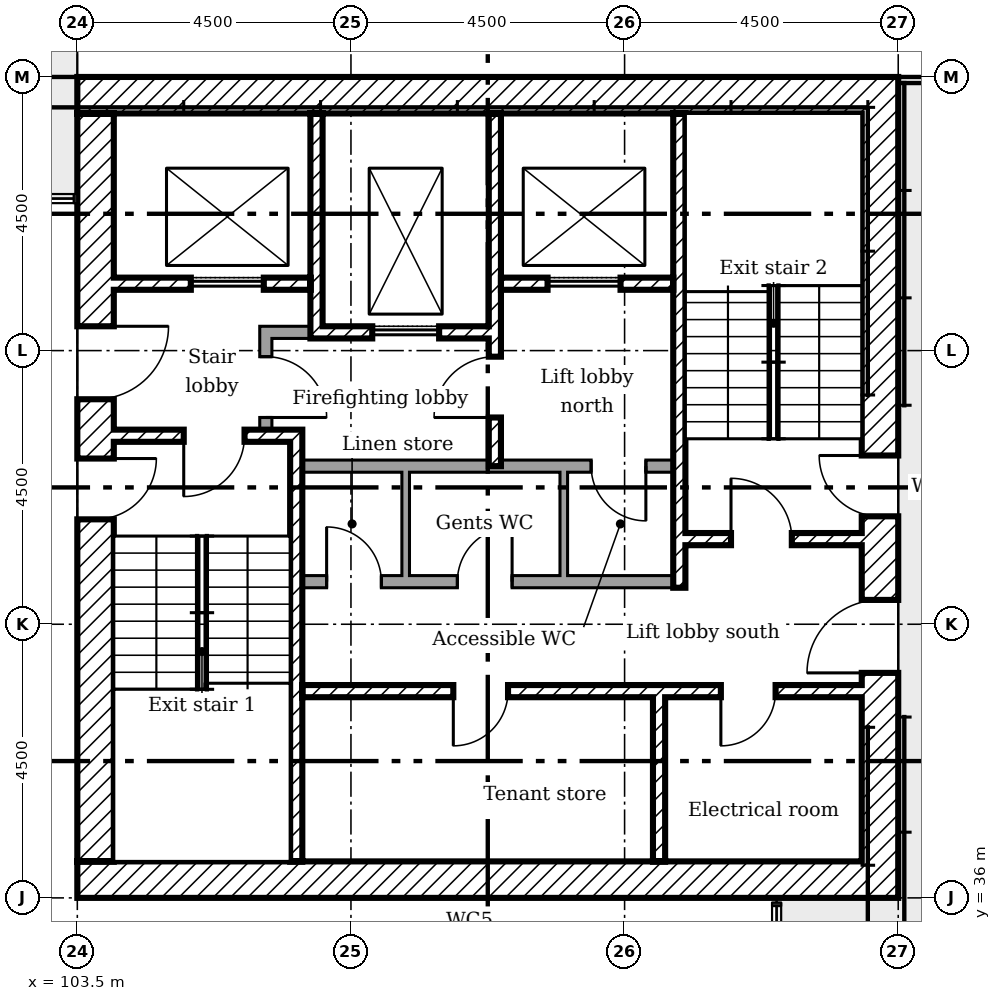
"""IFC4 building model, lengths in metres.
Left out: names, types, materials, properties, quantities, classifications, styles, units other than length and angle.
Written with IfcOpenShell. Run it as: python <this file> out.ifc"""

import sys

from ifc_helpers import new_model, si_unit, direction, frame, frame_2d, origin, place, context, subcontext, project, spatial, rectangle, extrude, element, fill, save


model = new_model("IFC4")
c1 = context("Model", 3, precision=1e-05, world=origin(), true_north=direction((0.0, 1.0)))
c2 = subcontext(c1, "Body", "Model", "MODEL_VIEW")
j1 = project(units=[si_unit("LENGTHUNIT", "METRE"), si_unit("PLANEANGLEUNIT", "RADIAN")], contexts=[c1])
p1 = place(None, origin())
s1 = spatial("IfcSite", under=j1, at=p1, CompositionType="ELEMENT")
p2 = place(p1, origin())
s2 = spatial("IfcBuilding", under=s1, at=p2, CompositionType="ELEMENT")
p3 = place(p2, frame((0.0, 0.0, 143.8)))
s3 = spatial("IfcBuildingStorey", under=s2, at=p3, CompositionType="ELEMENT", Elevation=143.8)
p4 = place(p3, frame((116.7, 36.0, 0.0), z_axis=(0.0, 0.0, 1.0), x_axis=(0.0, 1.0, 0.0)))
e1 = element("IfcWall", 1, at=p4, inside=s3, PredefinedType="SHEAR", context=c2, shape_type="SweptSolid", body=[
    extrude(rectangle(XDim=13.5, YDim=0.6, at=frame_2d((6.75, 0.0))), origin(), (0.0, 0.0, 1.0), 3.35),
])
p5 = place(p4, frame((3.7, 0.0, 0.0)))
e2 = element("IfcOpeningElement", 2, at=p5, cuts=e1, PredefinedType="OPENING", context=c2, shape_type="SweptSolid", body=[
    extrude(rectangle(XDim=1.2, YDim=2.1, at=frame_2d((0.6, 1.05))), frame((0.0, 0.31, 0.0), z_axis=(0.0, -1.0, 0.0), x_axis=(1.0, 0.0, 0.0)), (0.0, 0.0, 1.0), 0.62),
])
p6 = place(p4, frame((6.275, 0.0, 0.0)))
e3 = element("IfcOpeningElement", 3, at=p6, cuts=e1, PredefinedType="OPENING", context=c2, shape_type="SweptSolid", body=[
    extrude(rectangle(XDim=1.0, YDim=2.1, at=frame_2d((0.5, 1.05))), frame((0.0, 0.31, 0.0), z_axis=(0.0, -1.0, 0.0), x_axis=(1.0, 0.0, 0.0)), (0.0, 0.0, 1.0), 0.62),
])
for number, where in (
    (4, (103.5, 49.2, 0.0)),
    (5, (103.5, 36.3, 0.0)),
):
    element("IfcWall", number, at=place(p3, frame(where)), inside=s3, PredefinedType="SHEAR", context=c2, shape_type="SweptSolid", body=[
        extrude(rectangle(XDim=12.9, YDim=0.6, at=frame_2d((6.45, 0.0))), origin(), (0.0, 0.0, 1.0), 3.35),
    ])
p7 = place(p3, frame((103.8, 36.6, 0.0), z_axis=(0.0, 0.0, 1.0), x_axis=(0.0, 1.0, 0.0)))
e6 = element("IfcWall", 6, at=p7, inside=s3, PredefinedType="SHEAR", context=c2, shape_type="SweptSolid", body=[
    extrude(rectangle(XDim=12.3, YDim=0.6, at=frame_2d((6.15, 0.0))), origin(), (0.0, 0.0, 1.0), 3.35),
])
p8 = place(p7, frame((7.6, 0.0, 0.0)))
e7 = element("IfcOpeningElement", 7, at=p8, cuts=e6, PredefinedType="OPENING", context=c2, shape_type="SweptSolid", body=[
    extrude(rectangle(XDim=1.2, YDim=2.1, at=frame_2d((0.6, 1.05))), frame((0.0, 0.31, 0.0), z_axis=(0.0, -1.0, 0.0), x_axis=(1.0, 0.0, 0.0)), (0.0, 0.0, 1.0), 0.62),
])
p9 = place(p7, frame((5.625, 0.0, 0.0)))
e8 = element("IfcOpeningElement", 8, at=p9, cuts=e6, PredefinedType="OPENING", context=c2, shape_type="SweptSolid", body=[
    extrude(rectangle(XDim=1.0, YDim=2.1, at=frame_2d((0.5, 1.05))), frame((0.0, 0.31, 0.0), z_axis=(0.0, -1.0, 0.0), x_axis=(1.0, 0.0, 0.0)), (0.0, 0.0, 1.0), 0.62),
])
p10 = place(p3, frame((107.433, 48.9, 0.0), z_axis=(0.0, 0.0, 1.0), x_axis=(0.0, -1.0, 0.0)))
e9 = element("IfcWall", 9, at=p10, inside=s3, PredefinedType="SHEAR", context=c2, shape_type="SweptSolid", body=[
    extrude(rectangle(XDim=3.7, YDim=0.2, at=frame_2d((1.85, 0.0))), origin(), (0.0, 0.0, 1.0), 3.35),
])
p11 = place(p3, frame((110.367, 48.9, 0.0), z_axis=(0.0, 0.0, 1.0), x_axis=(0.0, -1.0, 0.0)))
e10 = element("IfcWall", 10, at=p11, inside=s3, PredefinedType="SHEAR", context=c2, shape_type="SweptSolid", body=[
    extrude(rectangle(XDim=5.8, YDim=0.2, at=frame_2d((2.9, 0.0))), origin(), (0.0, 0.0, 1.0), 3.35),
])
p12 = place(p11, frame((4.0, 0.0, 0.0)))
e11 = element("IfcOpeningElement", 11, at=p12, cuts=e10, PredefinedType="OPENING", context=c2, shape_type="SweptSolid", body=[
    extrude(rectangle(XDim=1.0, YDim=2.1, at=frame_2d((0.5, 1.05))), frame((0.0, 0.11, 0.0), z_axis=(0.0, -1.0, 0.0), x_axis=(1.0, 0.0, 0.0)), (0.0, 0.0, 1.0), 0.22),
])
p13 = place(p3, frame((113.067, 36.6, 0.0), z_axis=(0.0, 0.0, 1.0), x_axis=(0.0, 1.0, 0.0)))
e12 = element("IfcWall", 12, at=p13, inside=s3, PredefinedType="SHEAR", context=c2, shape_type="SweptSolid", body=[
    extrude(rectangle(XDim=2.7, YDim=0.2, at=frame_2d((1.35, 0.0))), origin(), (0.0, 0.0, 1.0), 3.35),
])
p14 = place(p3, frame((106.5, 45.3, 0.0)))
e13 = element("IfcWall", 13, at=p14, inside=s3, PredefinedType="PARTITIONING", context=c2, shape_type="SweptSolid", body=[
    extrude(rectangle(XDim=0.833, YDim=0.2, at=frame_2d((0.417, 0.0))), origin(), (0.0, 0.0, 1.0), 3.35),
])
p15 = place(p3, frame((106.6, 43.7, 0.0), z_axis=(0.0, 0.0, 1.0), x_axis=(0.0, 1.0, 0.0)))
e14 = element("IfcWall", 14, at=p15, inside=s3, PredefinedType="PARTITIONING", context=c2, shape_type="SweptSolid", body=[
    extrude(rectangle(XDim=1.5, YDim=0.2, at=frame_2d((0.75, 0.0))), origin(), (0.0, 0.0, 1.0), 3.35),
])
p16 = place(p15, frame((0.2, 0.0, 0.0)))
e15 = element("IfcOpeningElement", 15, at=p16, cuts=e14, PredefinedType="OPENING", context=c2, shape_type="SweptSolid", body=[
    extrude(rectangle(XDim=1.0, YDim=2.1, at=frame_2d((0.5, 1.05))), frame((0.0, 0.11, 0.0), z_axis=(0.0, -1.0, 0.0), x_axis=(1.0, 0.0, 0.0)), (0.0, 0.0, 1.0), 0.22),
])
p17 = place(p3, frame((104.1, 46.1, 0.0)))
e16 = element("IfcWall", 16, at=p17, inside=s3, PredefinedType="SHEAR", context=c2, shape_type="SweptSolid", body=[
    extrude(rectangle(XDim=3.233, YDim=0.2, at=frame_2d((1.617, 0.0))), origin(), (0.0, 0.0, 1.0), 3.35),
])
p18 = place(p17, frame((1.267, 0.0, 0.0)))
e17 = element("IfcOpeningElement", 17, at=p18, cuts=e16, PredefinedType="OPENING", context=c2, shape_type="SweptSolid", body=[
    extrude(rectangle(XDim=1.2, YDim=2.1, at=frame_2d((0.6, 1.05))), frame((0.0, 0.11, 0.0), z_axis=(0.0, -1.0, 0.0), x_axis=(1.0, 0.0, 0.0)), (0.0, 0.0, 1.0), 0.22),
])
p19 = place(p3, frame((110.467, 46.1, 0.0)))
e18 = element("IfcWall", 18, at=p19, inside=s3, PredefinedType="SHEAR", context=c2, shape_type="SweptSolid", body=[
    extrude(rectangle(XDim=2.833, YDim=0.2, at=frame_2d((1.417, 0.0))), origin(), (0.0, 0.0, 1.0), 3.35),
])
p20 = place(p19, frame((0.767, 0.0, 0.0)))
e19 = element("IfcOpeningElement", 19, at=p20, cuts=e18, PredefinedType="OPENING", context=c2, shape_type="SweptSolid", body=[
    extrude(rectangle(XDim=1.2, YDim=2.1, at=frame_2d((0.6, 1.05))), frame((0.0, 0.11, 0.0), z_axis=(0.0, -1.0, 0.0), x_axis=(1.0, 0.0, 0.0)), (0.0, 0.0, 1.0), 0.22),
])
p21 = place(p3, frame((107.533, 45.3, 0.0)))
e20 = element("IfcWall", 20, at=p21, inside=s3, PredefinedType="SHEAR", context=c2, shape_type="SweptSolid", body=[
    extrude(rectangle(XDim=2.733, YDim=0.2, at=frame_2d((1.367, 0.0))), origin(), (0.0, 0.0, 1.0), 3.35),
])
p22 = place(p21, frame((0.817, 0.0, 0.0)))
e21 = element("IfcOpeningElement", 21, at=p22, cuts=e20, PredefinedType="OPENING", context=c2, shape_type="SweptSolid", body=[
    extrude(rectangle(XDim=1.1, YDim=2.1, at=frame_2d((0.55, 1.05))), frame((0.0, 0.11, 0.0), z_axis=(0.0, -1.0, 0.0), x_axis=(1.0, 0.0, 0.0)), (0.0, 0.0, 1.0), 0.22),
])
p23 = place(p3, frame((107.2, 39.4, 0.0)))
e22 = element("IfcWall", 22, at=p23, inside=s3, PredefinedType="SHEAR", context=c2, shape_type="SweptSolid", body=[
    extrude(rectangle(XDim=9.2, YDim=0.2, at=frame_2d((4.6, 0.0))), origin(), (0.0, 0.0, 1.0), 3.35),
])
p24 = place(p23, frame((2.483, 0.0, 0.0)))
e23 = element("IfcOpeningElement", 23, at=p24, cuts=e22, PredefinedType="OPENING", context=c2, shape_type="SweptSolid", body=[
    extrude(rectangle(XDim=0.9, YDim=2.1, at=frame_2d((0.45, 1.05))), frame((0.0, 0.11, 0.0), z_axis=(0.0, -1.0, 0.0), x_axis=(1.0, 0.0, 0.0)), (0.0, 0.0, 1.0), 0.22),
])
p25 = place(p23, frame((6.883, 0.0, 0.0)))
e24 = element("IfcOpeningElement", 24, at=p25, cuts=e22, PredefinedType="OPENING", context=c2, shape_type="SweptSolid", body=[
    extrude(rectangle(XDim=0.9, YDim=2.1, at=frame_2d((0.45, 1.05))), frame((0.0, 0.11, 0.0), z_axis=(0.0, -1.0, 0.0), x_axis=(1.0, 0.0, 0.0)), (0.0, 0.0, 1.0), 0.22),
])
p26 = place(p3, frame((107.1, 36.6, 0.0), z_axis=(0.0, 0.0, 1.0), x_axis=(0.0, 1.0, 0.0)))
e25 = element("IfcWall", 25, at=p26, inside=s3, PredefinedType="SHEAR", context=c2, shape_type="SweptSolid", body=[
    extrude(rectangle(XDim=7.1, YDim=0.2, at=frame_2d((3.55, 0.0))), origin(), (0.0, 0.0, 1.0), 3.35),
])
p27 = place(p3, frame((104.1, 43.6, 0.0)))
e26 = element("IfcWall", 26, at=p27, inside=s3, PredefinedType="SHEAR", context=c2, shape_type="SweptSolid", body=[
    extrude(rectangle(XDim=2.9, YDim=0.2, at=frame_2d((1.45, 0.0))), origin(), (0.0, 0.0, 1.0), 3.35),
])
p28 = place(p27, frame((1.15, 0.0, 0.0)))
e27 = element("IfcOpeningElement", 27, at=p28, cuts=e26, PredefinedType="OPENING", context=c2, shape_type="SweptSolid", body=[
    extrude(rectangle(XDim=1.0, YDim=2.1, at=frame_2d((0.5, 1.05))), frame((0.0, 0.11, 0.0), z_axis=(0.0, -1.0, 0.0), x_axis=(1.0, 0.0, 0.0)), (0.0, 0.0, 1.0), 0.22),
])
p29 = place(p3, frame((113.5, 41.9, 0.0)))
e28 = element("IfcWall", 28, at=p29, inside=s3, PredefinedType="SHEAR", context=c2, shape_type="SweptSolid", body=[
    extrude(rectangle(XDim=2.9, YDim=0.2, at=frame_2d((1.45, 0.0))), origin(), (0.0, 0.0, 1.0), 3.35),
])
p30 = place(p29, frame((0.75, 0.0, 0.0)))
e29 = element("IfcOpeningElement", 29, at=p30, cuts=e28, PredefinedType="OPENING", context=c2, shape_type="SweptSolid", body=[
    extrude(rectangle(XDim=1.0, YDim=2.1, at=frame_2d((0.5, 1.05))), frame((0.0, 0.11, 0.0), z_axis=(0.0, -1.0, 0.0), x_axis=(1.0, 0.0, 0.0)), (0.0, 0.0, 1.0), 0.22),
])
p31 = place(p3, frame((113.4, 41.1, 0.0), z_axis=(0.0, 0.0, 1.0), x_axis=(0.0, 1.0, 0.0)))
e30 = element("IfcWall", 30, at=p31, inside=s3, PredefinedType="SHEAR", context=c2, shape_type="SweptSolid", body=[
    extrude(rectangle(XDim=7.8, YDim=0.2, at=frame_2d((3.9, 0.0))), origin(), (0.0, 0.0, 1.0), 3.35),
])
p32 = place(p3, frame((107.2, 43.1, 0.0)))
e31 = element("IfcWall", 31, at=p32, inside=s3, PredefinedType="PARTITIONING", context=c2, shape_type="SweptSolid", body=[
    extrude(rectangle(XDim=6.1, YDim=0.2, at=frame_2d((3.05, 0.0))), origin(), (0.0, 0.0, 1.0), 3.35),
])
p33 = place(p32, frame((4.75, 0.0, 0.0)))
e32 = element("IfcOpeningElement", 32, at=p33, cuts=e31, PredefinedType="OPENING", context=c2, shape_type="SweptSolid", body=[
    extrude(rectangle(XDim=0.9, YDim=2.1, at=frame_2d((0.45, 1.05))), frame((0.0, 0.11, 0.0), z_axis=(0.0, -1.0, 0.0), x_axis=(1.0, 0.0, 0.0)), (0.0, 0.0, 1.0), 0.22),
])
p34 = place(p3, frame((107.2, 41.2, 0.0)))
e33 = element("IfcWall", 33, at=p34, inside=s3, PredefinedType="PARTITIONING", context=c2, shape_type="SweptSolid", body=[
    extrude(rectangle(XDim=6.1, YDim=0.2, at=frame_2d((3.05, 0.0))), origin(), (0.0, 0.0, 1.0), 3.35),
])
p35 = place(p34, frame((0.4, 0.0, 0.0)))
e34 = element("IfcOpeningElement", 34, at=p35, cuts=e33, PredefinedType="OPENING", context=c2, shape_type="SweptSolid", body=[
    extrude(rectangle(XDim=0.9, YDim=2.1, at=frame_2d((0.45, 1.05))), frame((0.0, 0.11, 0.0), z_axis=(0.0, -1.0, 0.0), x_axis=(1.0, 0.0, 0.0)), (0.0, 0.0, 1.0), 0.22),
])
p36 = place(p34, frame((2.55, 0.0, 0.0)))
e35 = element("IfcOpeningElement", 35, at=p36, cuts=e33, PredefinedType="OPENING", context=c2, shape_type="SweptSolid", body=[
    extrude(rectangle(XDim=0.9, YDim=2.1, at=frame_2d((0.45, 1.05))), frame((0.0, 0.11, 0.0), z_axis=(0.0, -1.0, 0.0), x_axis=(1.0, 0.0, 0.0)), (0.0, 0.0, 1.0), 0.22),
])
for number, where, z_axis, x_axis in (
    (36, (108.9, 41.3, 0.0), (0.0, 0.0, 1.0), (0.0, 1.0, 0.0)),
    (37, (111.5, 41.3, 0.0), (0.0, 0.0, 1.0), (0.0, 1.0, 0.0)),
):
    element("IfcWall", number, at=place(p3, frame(where, z_axis=z_axis, x_axis=x_axis)), inside=s3, PredefinedType="PARTITIONING", context=c2, shape_type="SweptSolid", body=[
        extrude(rectangle(XDim=1.7, YDim=0.125, at=frame_2d((0.85, 0.0))), origin(), (0.0, 0.0, 1.0), 3.35),
    ])
p37 = place(p8, frame((1.2, 0.0, 0.0), x_axis=(-1.0, 0.0, 0.0)))
e38 = element("IfcDoor", 38, at=p37, inside=s3, OperationType="SINGLE_SWING_RIGHT", PredefinedType="DOOR", context=c2, shape_type="SweptSolid", body=[
    extrude(rectangle(XDim=1.2, YDim=2.1, at=frame_2d((0.6, 1.05))), frame((0.0, 0.025, 0.0), z_axis=(0.0, -1.0, 0.0), x_axis=(1.0, 0.0, 0.0)), (0.0, 0.0, 1.0), 0.05),
])
fill(e7, e38)
p38 = place(p5, origin())
e39 = element("IfcDoor", 39, at=p38, inside=s3, OperationType="SINGLE_SWING_RIGHT", PredefinedType="DOOR", context=c2, shape_type="SweptSolid", body=[
    extrude(rectangle(XDim=1.2, YDim=2.1, at=frame_2d((0.6, 1.05))), frame((0.0, 0.025, 0.0), z_axis=(0.0, -1.0, 0.0), x_axis=(1.0, 0.0, 0.0)), (0.0, 0.0, 1.0), 0.05),
])
fill(e2, e39)
p39 = place(p28, frame((1.0, 0.0, 0.0), x_axis=(-1.0, 0.0, 0.0)))
e40 = element("IfcDoor", 40, at=p39, inside=s3, OperationType="SINGLE_SWING_LEFT", PredefinedType="DOOR", context=c2, shape_type="SweptSolid", body=[
    extrude(rectangle(XDim=1.0, YDim=2.1, at=frame_2d((0.5, 1.05))), frame((0.0, 0.025, 0.0), z_axis=(0.0, -1.0, 0.0), x_axis=(1.0, 0.0, 0.0)), (0.0, 0.0, 1.0), 0.05),
])
fill(e27, e40)
p40 = place(p9, frame((1.0, 0.0, 0.0), x_axis=(-1.0, 0.0, 0.0)))
e41 = element("IfcDoor", 41, at=p40, inside=s3, OperationType="SINGLE_SWING_RIGHT", PredefinedType="DOOR", context=c2, shape_type="SweptSolid", body=[
    extrude(rectangle(XDim=1.0, YDim=2.1, at=frame_2d((0.5, 1.05))), frame((0.0, 0.025, 0.0), z_axis=(0.0, -1.0, 0.0), x_axis=(1.0, 0.0, 0.0)), (0.0, 0.0, 1.0), 0.05),
])
fill(e8, e41)
p41 = place(p30, origin())
e42 = element("IfcDoor", 42, at=p41, inside=s3, OperationType="SINGLE_SWING_RIGHT", PredefinedType="DOOR", context=c2, shape_type="SweptSolid", body=[
    extrude(rectangle(XDim=1.0, YDim=2.1, at=frame_2d((0.5, 1.05))), frame((0.0, 0.025, 0.0), z_axis=(0.0, -1.0, 0.0), x_axis=(1.0, 0.0, 0.0)), (0.0, 0.0, 1.0), 0.05),
])
fill(e29, e42)
p42 = place(p6, origin())
e43 = element("IfcDoor", 43, at=p42, inside=s3, OperationType="SINGLE_SWING_LEFT", PredefinedType="DOOR", context=c2, shape_type="SweptSolid", body=[
    extrude(rectangle(XDim=1.0, YDim=2.1, at=frame_2d((0.5, 1.05))), frame((0.0, 0.025, 0.0), z_axis=(0.0, -1.0, 0.0), x_axis=(1.0, 0.0, 0.0)), (0.0, 0.0, 1.0), 0.05),
])
fill(e3, e43)
p43 = place(p12, frame((1.0, 0.0, 0.0), x_axis=(-1.0, 0.0, 0.0)))
e44 = element("IfcDoor", 44, at=p43, inside=s3, OperationType="SINGLE_SWING_RIGHT", PredefinedType="DOOR", context=c2, shape_type="SweptSolid", body=[
    extrude(rectangle(XDim=1.0, YDim=2.1, at=frame_2d((0.5, 1.05))), frame((0.0, 0.025, 0.0), z_axis=(0.0, -1.0, 0.0), x_axis=(1.0, 0.0, 0.0)), (0.0, 0.0, 1.0), 0.05),
])
fill(e11, e44)
p44 = place(p16, frame((1.0, 0.0, 0.0), x_axis=(-1.0, 0.0, 0.0)))
e45 = element("IfcDoor", 45, at=p44, inside=s3, OperationType="SINGLE_SWING_LEFT", PredefinedType="DOOR", context=c2, shape_type="SweptSolid", body=[
    extrude(rectangle(XDim=1.0, YDim=2.1, at=frame_2d((0.5, 1.05))), frame((0.0, 0.025, 0.0), z_axis=(0.0, -1.0, 0.0), x_axis=(1.0, 0.0, 0.0)), (0.0, 0.0, 1.0), 0.05),
])
fill(e15, e45)
p45 = place(p24, frame((0.9, 0.0, 0.0), x_axis=(-1.0, 0.0, 0.0)))
e46 = element("IfcDoor", 46, at=p45, inside=s3, OperationType="SINGLE_SWING_LEFT", PredefinedType="DOOR", context=c2, shape_type="SweptSolid", body=[
    extrude(rectangle(XDim=0.9, YDim=2.1, at=frame_2d((0.45, 1.05))), frame((0.0, 0.025, 0.0), z_axis=(0.0, -1.0, 0.0), x_axis=(1.0, 0.0, 0.0)), (0.0, 0.0, 1.0), 0.05),
])
fill(e23, e46)
p46 = place(p25, frame((0.9, 0.0, 0.0), x_axis=(-1.0, 0.0, 0.0)))
e47 = element("IfcDoor", 47, at=p46, inside=s3, OperationType="SINGLE_SWING_LEFT", PredefinedType="DOOR", context=c2, shape_type="SweptSolid", body=[
    extrude(rectangle(XDim=0.9, YDim=2.1, at=frame_2d((0.45, 1.05))), frame((0.0, 0.025, 0.0), z_axis=(0.0, -1.0, 0.0), x_axis=(1.0, 0.0, 0.0)), (0.0, 0.0, 1.0), 0.05),
])
fill(e24, e47)
p47 = place(p35, origin())
e48 = element("IfcDoor", 48, at=p47, inside=s3, OperationType="SINGLE_SWING_RIGHT", PredefinedType="DOOR", context=c2, shape_type="SweptSolid", body=[
    extrude(rectangle(XDim=0.9, YDim=2.1, at=frame_2d((0.45, 1.05))), frame((0.0, 0.025, 0.0), z_axis=(0.0, -1.0, 0.0), x_axis=(1.0, 0.0, 0.0)), (0.0, 0.0, 1.0), 0.05),
])
fill(e34, e48)
p48 = place(p36, origin())
e49 = element("IfcDoor", 49, at=p48, inside=s3, OperationType="SINGLE_SWING_LEFT", PredefinedType="DOOR", context=c2, shape_type="SweptSolid", body=[
    extrude(rectangle(XDim=0.9, YDim=2.1, at=frame_2d((0.45, 1.05))), frame((0.0, 0.025, 0.0), z_axis=(0.0, -1.0, 0.0), x_axis=(1.0, 0.0, 0.0)), (0.0, 0.0, 1.0), 0.05),
])
fill(e35, e49)
p49 = place(p33, frame((0.9, 0.0, 0.0), x_axis=(-1.0, 0.0, 0.0)))
e50 = element("IfcDoor", 50, at=p49, inside=s3, OperationType="SINGLE_SWING_RIGHT", PredefinedType="DOOR", context=c2, shape_type="SweptSolid", body=[
    extrude(rectangle(XDim=0.9, YDim=2.1, at=frame_2d((0.45, 1.05))), frame((0.0, 0.025, 0.0), z_axis=(0.0, -1.0, 0.0), x_axis=(1.0, 0.0, 0.0)), (0.0, 0.0, 1.0), 0.05),
])
fill(e32, e50)
p50 = place(p22, origin())
e51 = element("IfcDoor", 51, at=p50, inside=s3, OperationType="SLIDING_TO_LEFT", PredefinedType="DOOR", context=c2, shape_type="SweptSolid", body=[
    extrude(rectangle(XDim=1.1, YDim=2.1, at=frame_2d((0.55, 1.05))), frame((0.0, 0.025, 0.0), z_axis=(0.0, -1.0, 0.0), x_axis=(1.0, 0.0, 0.0)), (0.0, 0.0, 1.0), 0.05),
])
fill(e21, e51)
p51 = place(p18, origin())
e52 = element("IfcDoor", 52, at=p51, inside=s3, OperationType="SLIDING_TO_LEFT", PredefinedType="DOOR", context=c2, shape_type="SweptSolid", body=[
    extrude(rectangle(XDim=1.2, YDim=2.1, at=frame_2d((0.6, 1.05))), frame((0.0, 0.025, 0.0), z_axis=(0.0, -1.0, 0.0), x_axis=(1.0, 0.0, 0.0)), (0.0, 0.0, 1.0), 0.05),
])
fill(e17, e52)
p52 = place(p20, origin())
e53 = element("IfcDoor", 53, at=p52, inside=s3, OperationType="SLIDING_TO_LEFT", PredefinedType="DOOR", context=c2, shape_type="SweptSolid", body=[
    extrude(rectangle(XDim=1.2, YDim=2.1, at=frame_2d((0.6, 1.05))), frame((0.0, 0.025, 0.0), z_axis=(0.0, -1.0, 0.0), x_axis=(1.0, 0.0, 0.0)), (0.0, 0.0, 1.0), 0.05),
])
fill(e19, e53)
save(model, sys.argv[1])
